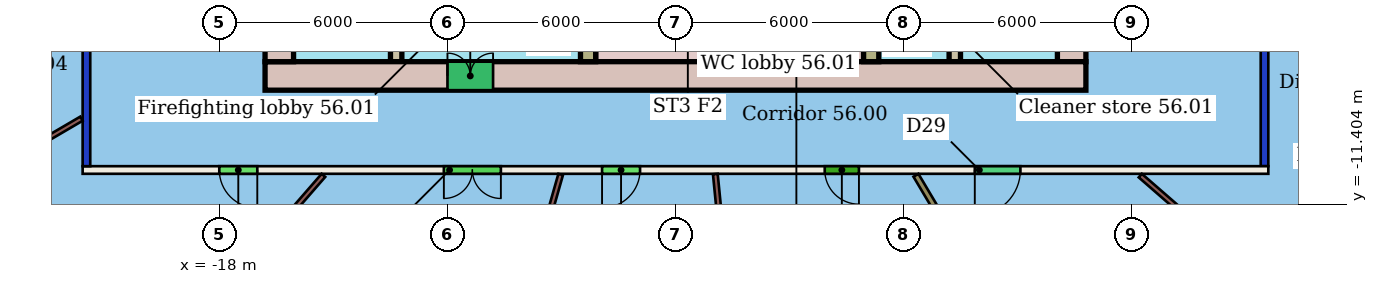
"""IFC4 building model, lengths in metres.
Left out: names, types, materials, properties, quantities, classifications, styles, units other than length and angle.
Written with IfcOpenShell. Run it as: python <this file> out.ifc"""

import sys

from ifc_helpers import new_model, si_unit, direction, frame, frame_2d, origin, place, context, subcontext, project, spatial, rectangle, extrude, element, fill, save


model = new_model("IFC4")
c1 = context("Model", 3, precision=1e-05, world=origin(), true_north=direction((0.0, 1.0)))
c2 = subcontext(c1, "Body", "Model", "MODEL_VIEW")
j1 = project(units=[si_unit("LENGTHUNIT", "METRE"), si_unit("PLANEANGLEUNIT", "RADIAN")], contexts=[c1])
p1 = place(None, origin())
s1 = spatial("IfcSite", under=j1, at=p1, CompositionType="ELEMENT")
p2 = place(p1, origin())
s2 = spatial("IfcBuilding", under=s1, at=p2, CompositionType="ELEMENT")
p3 = place(p2, frame((0.0, 0.0, 228.1)))
s3 = spatial("IfcBuildingStorey", under=s2, at=p3, CompositionType="ELEMENT", Elevation=228.1)
p4 = place(p3, frame((9.6, -10.5, 0.0), z_axis=(0.0, 0.0, 1.0), x_axis=(-1.0, 0.0, 0.0)))
e1 = element("IfcWall", 1, at=p4, inside=s3, PredefinedType="PARTITIONING", context=c2, shape_type="SweptSolid", body=[
    extrude(rectangle(XDim=31.2, YDim=0.2, at=frame_2d((15.6, 0.0))), origin(), (0.0, 0.0, 1.0), 3.45),
])
p5 = place(p4, frame((26.604, 0.0, 0.0)))
e2 = element("IfcOpeningElement", 2, at=p5, cuts=e1, PredefinedType="OPENING", context=c2, shape_type="SweptSolid", body=[
    extrude(rectangle(XDim=1.0, YDim=2.4, at=frame_2d((0.5, 1.2))), frame((0.0, 0.11, 0.0), z_axis=(0.0, -1.0, 0.0), x_axis=(1.0, 0.0, 0.0)), (0.0, 0.0, 1.0), 0.22),
])
p6 = place(p4, frame((20.195, 0.0, 0.0)))
e3 = element("IfcOpeningElement", 3, at=p6, cuts=e1, PredefinedType="OPENING", context=c2, shape_type="SweptSolid", body=[
    extrude(rectangle(XDim=1.5, YDim=2.1, at=frame_2d((0.75, 1.05))), frame((0.0, 0.11, 0.0), z_axis=(0.0, -1.0, 0.0), x_axis=(1.0, 0.0, 0.0)), (0.0, 0.0, 1.0), 0.22),
])
p7 = place(p4, frame((16.532, 0.0, 0.0)))
e4 = element("IfcOpeningElement", 4, at=p7, cuts=e1, PredefinedType="OPENING", context=c2, shape_type="SweptSolid", body=[
    extrude(rectangle(XDim=1.0, YDim=2.4, at=frame_2d((0.5, 1.2))), frame((0.0, 0.11, 0.0), z_axis=(0.0, -1.0, 0.0), x_axis=(1.0, 0.0, 0.0)), (0.0, 0.0, 1.0), 0.22),
])
p8 = place(p4, frame((10.772, 0.0, 0.0)))
e5 = element("IfcOpeningElement", 5, at=p8, cuts=e1, PredefinedType="OPENING", context=c2, shape_type="SweptSolid", body=[
    extrude(rectangle(XDim=0.9, YDim=2.1, at=frame_2d((0.45, 1.05))), frame((0.0, 0.11, 0.0), z_axis=(0.0, -1.0, 0.0), x_axis=(1.0, 0.0, 0.0)), (0.0, 0.0, 1.0), 0.22),
])
p9 = place(p4, frame((6.524, 0.0, 0.0)))
e6 = element("IfcOpeningElement", 6, at=p9, cuts=e1, PredefinedType="OPENING", context=c2, shape_type="SweptSolid", body=[
    extrude(rectangle(XDim=1.2, YDim=2.4, at=frame_2d((0.6, 1.2))), frame((0.0, 0.11, 0.0), z_axis=(0.0, -1.0, 0.0), x_axis=(1.0, 0.0, 0.0)), (0.0, 0.0, 1.0), 0.22),
])
p10 = place(p3, frame((-21.5, -10.4, 0.0), z_axis=(0.0, 0.0, 1.0), x_axis=(0.0, 1.0, 0.0)))
e7 = element("IfcWall", 7, at=p10, inside=s3, PredefinedType="PARTITIONING", context=c2, shape_type="SweptSolid", body=[
    extrude(rectangle(XDim=20.8, YDim=0.2, at=frame_2d((10.4, 0.0))), origin(), (0.0, 0.0, 1.0), 3.05),
])
p11 = place(p10, frame((14.597, 0.0, 0.0)))
e8 = element("IfcOpeningElement", 8, at=p11, cuts=e7, PredefinedType="OPENING", context=c2, shape_type="SweptSolid", body=[
    extrude(rectangle(XDim=1.0, YDim=2.4, at=frame_2d((0.5, 1.2))), frame((0.0, 0.11, 0.0), z_axis=(0.0, -1.0, 0.0), x_axis=(1.0, 0.0, 0.0)), (0.0, 0.0, 1.0), 0.22),
])
p12 = place(p10, frame((7.884, 0.0, 0.0)))
e9 = element("IfcOpeningElement", 9, at=p12, cuts=e7, PredefinedType="OPENING", context=c2, shape_type="SweptSolid", body=[
    extrude(rectangle(XDim=1.0, YDim=2.4, at=frame_2d((0.5, 1.2))), frame((0.0, 0.11, 0.0), z_axis=(0.0, -1.0, 0.0), x_axis=(1.0, 0.0, 0.0)), (0.0, 0.0, 1.0), 0.22),
])
p13 = place(p3, frame((9.5, 10.4, 0.0), z_axis=(0.0, 0.0, 1.0), x_axis=(0.0, -1.0, 0.0)))
e10 = element("IfcWall", 10, at=p13, inside=s3, PredefinedType="PARTITIONING", context=c2, shape_type="SweptSolid", body=[
    extrude(rectangle(XDim=20.8, YDim=0.2, at=frame_2d((10.4, 0.0))), origin(), (0.0, 0.0, 1.0), 3.05),
])
p14 = place(p13, frame((16.182, 0.0, 0.0)))
e11 = element("IfcOpeningElement", 11, at=p14, cuts=e10, PredefinedType="OPENING", context=c2, shape_type="SweptSolid", body=[
    extrude(rectangle(XDim=1.0, YDim=2.4, at=frame_2d((0.5, 1.2))), frame((0.0, 0.11, 0.0), z_axis=(0.0, -1.0, 0.0), x_axis=(1.0, 0.0, 0.0)), (0.0, 0.0, 1.0), 0.22),
])
p15 = place(p13, frame((12.086, 0.0, 0.0)))
e12 = element("IfcOpeningElement", 12, at=p15, cuts=e10, PredefinedType="OPENING", context=c2, shape_type="SweptSolid", body=[
    extrude(rectangle(XDim=1.0, YDim=2.4, at=frame_2d((0.5, 1.2))), frame((0.0, 0.11, 0.0), z_axis=(0.0, -1.0, 0.0), x_axis=(1.0, 0.0, 0.0)), (0.0, 0.0, 1.0), 0.22),
])
p16 = place(p13, frame((6.779, 0.0, 0.0)))
e13 = element("IfcOpeningElement", 13, at=p16, cuts=e10, PredefinedType="OPENING", context=c2, shape_type="SweptSolid", body=[
    extrude(rectangle(XDim=0.9, YDim=2.1, at=frame_2d((0.45, 1.05))), frame((0.0, 0.11, 0.0), z_axis=(0.0, -1.0, 0.0), x_axis=(1.0, 0.0, 0.0)), (0.0, 0.0, 1.0), 0.22),
])
p17 = place(p13, frame((2.875, 0.0, 0.0)))
e14 = element("IfcOpeningElement", 14, at=p17, cuts=e10, PredefinedType="OPENING", context=c2, shape_type="SweptSolid", body=[
    extrude(rectangle(XDim=1.2, YDim=2.4, at=frame_2d((0.6, 1.2))), frame((0.0, 0.11, 0.0), z_axis=(0.0, -1.0, 0.0), x_axis=(1.0, 0.0, 0.0)), (0.0, 0.0, 1.0), 0.22),
])
p18 = place(p3, frame((-28.382, -13.102, 0.0), z_axis=(0.0, 0.0, 1.0), x_axis=(0.863003515908, 0.505197913229, 0.0)))
e15 = element("IfcWall", 15, at=p18, inside=s3, PredefinedType="PARTITIONING", context=c2, shape_type="SweptSolid", body=[
    extrude(rectangle(XDim=7.822, YDim=0.125, at=frame_2d((3.911, 0.0))), origin(), (0.0, 0.0, 1.0), 3.45),
])
p19 = place(p3, frame((-23.457, -20.054, 0.0), z_axis=(0.0, 0.0, 1.0), x_axis=(0.656578688223, 0.754257533056, 0.0)))
e16 = element("IfcWall", 16, at=p19, inside=s3, PredefinedType="PARTITIONING", context=c2, shape_type="SweptSolid", body=[
    extrude(rectangle(XDim=12.479, YDim=0.125, at=frame_2d((6.24, 0.0))), origin(), (0.0, 0.0, 1.0), 3.45),
])
p20 = place(p3, frame((-12.969, -24.489, 0.0), z_axis=(0.0, 0.0, 1.0), x_axis=(0.273703716184, 0.961814054663, 0.0)))
e17 = element("IfcWall", 17, at=p20, inside=s3, PredefinedType="PARTITIONING", context=c2, shape_type="SweptSolid", body=[
    extrude(rectangle(XDim=14.423, YDim=0.125, at=frame_2d((7.211, 0.0))), origin(), (0.0, 0.0, 1.0), 3.45),
])
p21 = place(p3, frame((-3.674, -23.527, 0.0), z_axis=(0.0, 0.0, 1.0), x_axis=(-0.098381018265, 0.995148820652, 0.0)))
e18 = element("IfcWall", 18, at=p21, inside=s3, PredefinedType="PARTITIONING", context=c2, shape_type="SweptSolid", body=[
    extrude(rectangle(XDim=12.984, YDim=0.125, at=frame_2d((6.492, 0.0))), origin(), (0.0, 0.0, 1.0), 3.45),
])
p22 = place(p3, frame((5.283, -18.97, 0.0), z_axis=(0.0, 0.0, 1.0), x_axis=(-0.511199592551, 0.859462027419, 0.0)))
e19 = element("IfcWall", 19, at=p22, inside=s3, PredefinedType="PARTITIONING", context=c2, shape_type="SweptSolid", body=[
    extrude(rectangle(XDim=9.695, YDim=0.15, at=frame_2d((4.847, 0.0))), origin(), (0.0, 0.0, 1.0), 3.45),
])
p23 = place(p3, frame((10.375, -14.255, 0.0), z_axis=(0.0, 0.0, 1.0), x_axis=(-0.754250521581, 0.656586742704, 0.0)))
e20 = element("IfcWall", 20, at=p23, inside=s3, PredefinedType="PARTITIONING", context=c2, shape_type="SweptSolid", body=[
    extrude(rectangle(XDim=5.495, YDim=0.125, at=frame_2d((2.747, 0.0))), origin(), (0.0, 0.0, 1.0), 3.45),
])
p24 = place(p3, frame((-16.8, -8.025, 0.0), z_axis=(0.0, 0.0, 1.0), x_axis=(1.0, 0.0, 0.0)))
e21 = element("IfcWall", 21, at=p24, inside=s3, PredefinedType="SHEAR", context=c2, shape_type="SweptSolid", body=[
    extrude(rectangle(XDim=21.6, YDim=0.75, at=frame_2d((10.8, 0.0))), origin(), (0.0, 0.0, 1.0), 3.3),
])
p25 = place(p24, frame((4.8, 0.0, 0.0)))
e22 = element("IfcOpeningElement", 22, at=p25, cuts=e21, PredefinedType="OPENING", context=c2, shape_type="SweptSolid", body=[
    extrude(rectangle(XDim=1.2, YDim=2.1, at=frame_2d((0.6, 1.05))), frame((0.0, 0.385, 0.0), z_axis=(0.0, -1.0, 0.0), x_axis=(1.0, 0.0, 0.0)), (0.0, 0.0, 1.0), 0.77),
])
p26 = place(p3, frame((-16.425, 7.65, 0.0), z_axis=(0.0, 0.0, 1.0), x_axis=(0.0, -1.0, 0.0)))
e23 = element("IfcWall", 23, at=p26, inside=s3, PredefinedType="SHEAR", context=c2, shape_type="SweptSolid", body=[
    extrude(rectangle(XDim=15.3, YDim=0.75, at=frame_2d((7.65, 0.0))), origin(), (0.0, 0.0, 1.0), 3.3),
])
p27 = place(p26, frame((11.25, 0.0, 0.0)))
e24 = element("IfcOpeningElement", 24, at=p27, cuts=e23, PredefinedType="OPENING", context=c2, shape_type="SweptSolid", body=[
    extrude(rectangle(XDim=1.2, YDim=2.1, at=frame_2d((0.6, 1.05))), frame((0.0, 0.385, 0.0), z_axis=(0.0, -1.0, 0.0), x_axis=(1.0, 0.0, 0.0)), (0.0, 0.0, 1.0), 0.77),
])
p28 = place(p26, frame((2.85, 0.0, 0.0)))
e25 = element("IfcOpeningElement", 25, at=p28, cuts=e23, PredefinedType="OPENING", context=c2, shape_type="SweptSolid", body=[
    extrude(rectangle(XDim=1.2, YDim=2.1, at=frame_2d((0.6, 1.05))), frame((0.0, 0.385, 0.0), z_axis=(0.0, -1.0, 0.0), x_axis=(1.0, 0.0, 0.0)), (0.0, 0.0, 1.0), 0.77),
])
p29 = place(p3, frame((4.425, -7.65, 0.0), z_axis=(0.0, 0.0, 1.0), x_axis=(0.0, 1.0, 0.0)))
e26 = element("IfcWall", 26, at=p29, inside=s3, PredefinedType="SHEAR", context=c2, shape_type="SweptSolid", body=[
    extrude(rectangle(XDim=15.3, YDim=0.75, at=frame_2d((7.65, 0.0))), origin(), (0.0, 0.0, 1.0), 3.3),
])
p30 = place(p29, frame((2.85, 0.0, 0.0)))
e27 = element("IfcOpeningElement", 27, at=p30, cuts=e26, PredefinedType="OPENING", context=c2, shape_type="SweptSolid", body=[
    extrude(rectangle(XDim=1.2, YDim=2.1, at=frame_2d((0.6, 1.05))), frame((0.0, 0.385, 0.0), z_axis=(0.0, -1.0, 0.0), x_axis=(1.0, 0.0, 0.0)), (0.0, 0.0, 1.0), 0.77),
])
p31 = place(p29, frame((11.25, 0.0, 0.0)))
e28 = element("IfcOpeningElement", 28, at=p31, cuts=e26, PredefinedType="OPENING", context=c2, shape_type="SweptSolid", body=[
    extrude(rectangle(XDim=1.2, YDim=2.1, at=frame_2d((0.6, 1.05))), frame((0.0, 0.385, 0.0), z_axis=(0.0, -1.0, 0.0), x_axis=(1.0, 0.0, 0.0)), (0.0, 0.0, 1.0), 0.77),
])
p32 = place(p3, frame((-13.35, 7.65, 0.0), z_axis=(0.0, 0.0, 1.0), x_axis=(0.0, -1.0, 0.0)))
e29 = element("IfcWall", 29, at=p32, inside=s3, PredefinedType="SHEAR", context=c2, shape_type="SweptSolid", body=[
    extrude(rectangle(XDim=15.3, YDim=0.3, at=frame_2d((7.65, 0.0))), origin(), (0.0, 0.0, 1.0), 3.3),
])
p33 = place(p32, frame((6.9, 0.0, 0.0)))
e30 = element("IfcOpeningElement", 30, at=p33, cuts=e29, PredefinedType="OPENING", context=c2, shape_type="SweptSolid", body=[
    extrude(rectangle(XDim=1.5, YDim=2.1, at=frame_2d((0.75, 1.05))), frame((0.0, 0.16, 0.0), z_axis=(0.0, -1.0, 0.0), x_axis=(1.0, 0.0, 0.0)), (0.0, 0.0, 1.0), 0.32),
])
p34 = place(p3, frame((1.35, -7.65, 0.0), z_axis=(0.0, 0.0, 1.0), x_axis=(0.0, 1.0, 0.0)))
e31 = element("IfcWall", 31, at=p34, inside=s3, PredefinedType="SHEAR", context=c2, shape_type="SweptSolid", body=[
    extrude(rectangle(XDim=15.3, YDim=0.3, at=frame_2d((7.65, 0.0))), origin(), (0.0, 0.0, 1.0), 3.3),
])
p35 = place(p34, frame((1.56, 0.0, 0.0)))
e32 = element("IfcOpeningElement", 32, at=p35, cuts=e31, PredefinedType="OPENING", context=c2, shape_type="SweptSolid", body=[
    extrude(rectangle(XDim=1.0, YDim=2.1, at=frame_2d((0.5, 1.05))), frame((0.0, 0.16, 0.0), z_axis=(0.0, -1.0, 0.0), x_axis=(1.0, 0.0, 0.0)), (0.0, 0.0, 1.0), 0.32),
])
p36 = place(p34, frame((6.9, 0.0, 0.0)))
e33 = element("IfcOpeningElement", 33, at=p36, cuts=e31, PredefinedType="OPENING", context=c2, shape_type="SweptSolid", body=[
    extrude(rectangle(XDim=1.5, YDim=2.1, at=frame_2d((0.75, 1.05))), frame((0.0, 0.16, 0.0), z_axis=(0.0, -1.0, 0.0), x_axis=(1.0, 0.0, 0.0)), (0.0, 0.0, 1.0), 0.32),
])
p37 = place(p3, frame((-8.3, -3.88, 0.0), z_axis=(0.0, 0.0, 1.0), x_axis=(0.0, -1.0, 0.0)))
e34 = element("IfcWall", 34, at=p37, inside=s3, PredefinedType="SHEAR", context=c2, shape_type="SweptSolid", body=[
    extrude(rectangle(XDim=3.77, YDim=0.4, at=frame_2d((1.885, 0.0))), origin(), (0.0, 0.0, 1.0), 3.3),
])
p38 = place(p37, frame((1.11, 0.0, 0.0)))
e35 = element("IfcOpeningElement", 35, at=p38, cuts=e34, PredefinedType="OPENING", context=c2, shape_type="SweptSolid", body=[
    extrude(rectangle(XDim=1.2, YDim=2.1, at=frame_2d((0.6, 1.05))), frame((0.0, 0.21, 0.0), z_axis=(0.0, -1.0, 0.0), x_axis=(1.0, 0.0, 0.0)), (0.0, 0.0, 1.0), 0.42),
])
p39 = place(p3, frame((-0.85, -3.88, 0.0), z_axis=(0.0, 0.0, 1.0), x_axis=(0.0, -1.0, 0.0)))
e36 = element("IfcWall", 36, at=p39, inside=s3, PredefinedType="SHEAR", context=c2, shape_type="SweptSolid", body=[
    extrude(rectangle(XDim=3.77, YDim=0.4, at=frame_2d((1.885, 0.0))), origin(), (0.0, 0.0, 1.0), 3.3),
])
p40 = place(p3, frame((-8.1, -7.475, 0.0), z_axis=(0.0, 0.0, 1.0), x_axis=(1.0, 0.0, 0.0)))
e37 = element("IfcWall", 37, at=p40, inside=s3, PredefinedType="SHEAR", context=c2, shape_type="SweptSolid", body=[
    extrude(rectangle(XDim=7.05, YDim=0.35, at=frame_2d((3.525, 0.0))), origin(), (0.0, 0.0, 1.0), 3.3),
])
p41 = place(p5, origin())
e38 = element("IfcDoor", 38, at=p41, inside=s3, OperationType="SINGLE_SWING_LEFT", PredefinedType="DOOR", context=c2, shape_type="SweptSolid", body=[
    extrude(rectangle(XDim=1.0, YDim=2.4, at=frame_2d((0.5, 1.2))), frame((0.0, 0.025, 0.0), z_axis=(0.0, -1.0, 0.0), x_axis=(1.0, 0.0, 0.0)), (0.0, 0.0, 1.0), 0.05),
])
fill(e2, e38)
p42 = place(p6, origin())
e39 = element("IfcDoor", 39, at=p42, inside=s3, OperationType="DOUBLE_DOOR_SINGLE_SWING", PredefinedType="DOOR", context=c2, shape_type="SweptSolid", body=[
    extrude(rectangle(XDim=1.5, YDim=2.1, at=frame_2d((0.75, 1.05))), frame((0.0, 0.025, 0.0), z_axis=(0.0, -1.0, 0.0), x_axis=(1.0, 0.0, 0.0)), (0.0, 0.0, 1.0), 0.05),
])
fill(e3, e39)
p43 = place(p7, origin())
e40 = element("IfcDoor", 40, at=p43, inside=s3, OperationType="SINGLE_SWING_RIGHT", PredefinedType="DOOR", context=c2, shape_type="SweptSolid", body=[
    extrude(rectangle(XDim=1.0, YDim=2.4, at=frame_2d((0.5, 1.2))), frame((0.0, 0.025, 0.0), z_axis=(0.0, -1.0, 0.0), x_axis=(1.0, 0.0, 0.0)), (0.0, 0.0, 1.0), 0.05),
])
fill(e4, e40)
p44 = place(p8, origin())
e41 = element("IfcDoor", 41, at=p44, inside=s3, OperationType="SINGLE_SWING_LEFT", PredefinedType="DOOR", context=c2, shape_type="SweptSolid", body=[
    extrude(rectangle(XDim=0.9, YDim=2.1, at=frame_2d((0.45, 1.05))), frame((0.0, 0.025, 0.0), z_axis=(0.0, -1.0, 0.0), x_axis=(1.0, 0.0, 0.0)), (0.0, 0.0, 1.0), 0.05),
])
fill(e5, e41)
p45 = place(p9, origin())
e42 = element("IfcDoor", 42, at=p45, inside=s3, OperationType="SINGLE_SWING_RIGHT", PredefinedType="DOOR", context=c2, shape_type="SweptSolid", body=[
    extrude(rectangle(XDim=1.2, YDim=2.4, at=frame_2d((0.6, 1.2))), frame((0.0, 0.025, 0.0), z_axis=(0.0, -1.0, 0.0), x_axis=(1.0, 0.0, 0.0)), (0.0, 0.0, 1.0), 0.05),
])
fill(e6, e42)
p46 = place(p25, origin())
e43 = element("IfcDoor", 43, at=p46, inside=s3, OperationType="DOUBLE_DOOR_SINGLE_SWING", PredefinedType="NOTDEFINED", context=c2, shape_type="SweptSolid", body=[
    extrude(rectangle(XDim=1.2, YDim=2.1, at=frame_2d((0.6, 1.05))), frame((0.0, 0.025, 0.0), z_axis=(0.0, -1.0, 0.0), x_axis=(1.0, 0.0, 0.0)), (0.0, 0.0, 1.0), 0.05),
])
fill(e22, e43)
save(model, sys.argv[1])
